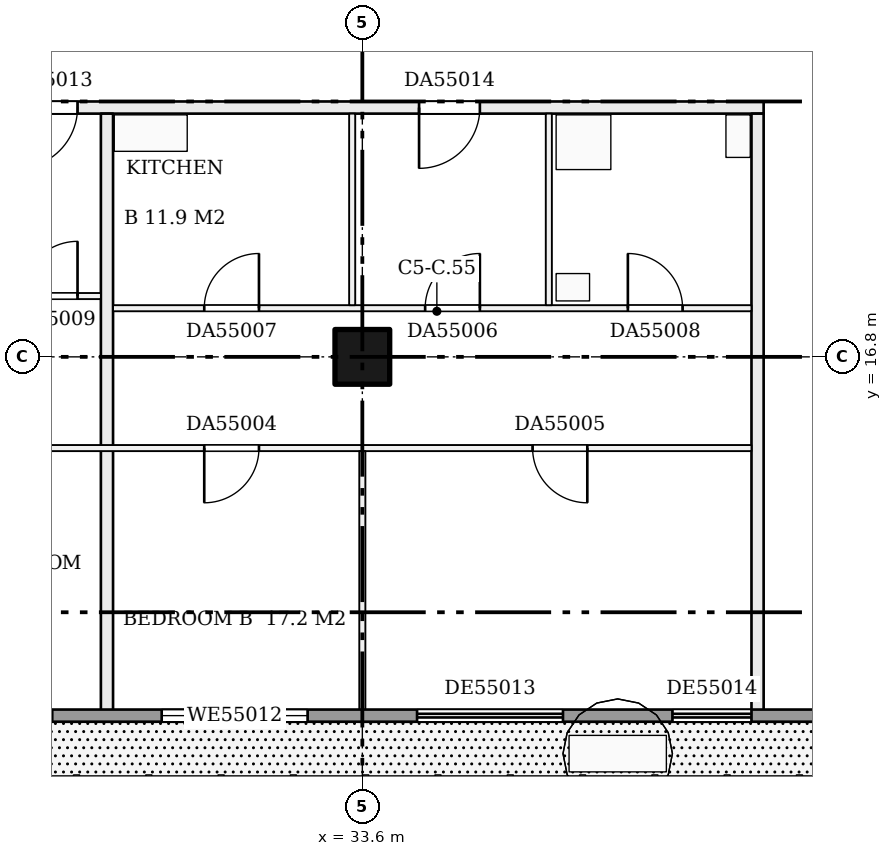
"""IFC4 building model, lengths in metres.
Left out: names, types, materials, properties, quantities, classifications, styles, units other than length and angle.
Written with IfcOpenShell. Run it as: python <this file> out.ifc"""

import sys

from ifc_helpers import new_model, si_unit, direction, frame, frame_2d, origin, origin_2d, place, context, subcontext, project, spatial, rectangle, extrude, element, fill, save


model = new_model("IFC4")
c1 = context("Model", 3, precision=1e-05, world=origin(), true_north=direction((0.0, 1.0)))
c2 = subcontext(c1, "Body", "Model", "MODEL_VIEW")
j1 = project(units=[si_unit("LENGTHUNIT", "METRE"), si_unit("PLANEANGLEUNIT", "RADIAN")], contexts=[c1])
p1 = place(None, origin())
s1 = spatial("IfcSite", under=j1, at=p1, CompositionType="ELEMENT")
p2 = place(p1, origin())
s2 = spatial("IfcBuilding", under=s1, at=p2, CompositionType="ELEMENT")
p3 = place(p2, frame((0.0, 0.0, 214.2)))
s3 = spatial("IfcBuildingStorey", under=s2, at=p3, CompositionType="ELEMENT", Elevation=214.2)
p4 = place(p3, frame((33.6, 16.8, 0.0), z_axis=(0.0, 0.0, 1.0), x_axis=(1.0, 0.0, 0.0)))
e1 = element("IfcColumn", 1, at=p4, inside=s3, PredefinedType="COLUMN", context=c2, shape_type="SweptSolid", body=[
    extrude(rectangle(XDim=0.9, YDim=0.9, at=origin_2d()), origin(), (0.0, 0.0, 1.0), 3.22),
])
p5 = place(p3, frame((21.1, 15.3, 0.0), z_axis=(0.0, 0.0, 1.0), x_axis=(1.0, 0.0, 0.0)))
e2 = element("IfcWall", 2, at=p5, inside=s3, PredefinedType="PARTITIONING", context=c2, shape_type="SweptSolid", body=[
    extrude(rectangle(XDim=18.9, YDim=0.1, at=frame_2d((9.45, 0.0))), origin(), (0.0, 0.0, 1.0), 3.22),
])
p6 = place(p5, frame((1.6, 0.0, 0.0)))
e3 = element("IfcOpeningElement", 3, at=p6, cuts=e2, PredefinedType="OPENING", context=c2, shape_type="SweptSolid", body=[
    extrude(rectangle(XDim=0.9, YDim=2.1, at=frame_2d((0.45, 1.05))), frame((0.0, 0.06, 0.0), z_axis=(0.0, -1.0, 0.0), x_axis=(1.0, 0.0, 0.0)), (0.0, 0.0, 1.0), 0.12),
])
p7 = place(p5, frame((5.7, 0.0, 0.0)))
e4 = element("IfcOpeningElement", 4, at=p7, cuts=e2, PredefinedType="OPENING", context=c2, shape_type="SweptSolid", body=[
    extrude(rectangle(XDim=0.9, YDim=2.1, at=frame_2d((0.45, 1.05))), frame((0.0, 0.06, 0.0), z_axis=(0.0, -1.0, 0.0), x_axis=(1.0, 0.0, 0.0)), (0.0, 0.0, 1.0), 0.12),
])
p8 = place(p5, frame((9.9, 0.0, 0.0)))
e5 = element("IfcOpeningElement", 5, at=p8, cuts=e2, PredefinedType="OPENING", context=c2, shape_type="SweptSolid", body=[
    extrude(rectangle(XDim=0.9, YDim=2.1, at=frame_2d((0.45, 1.05))), frame((0.0, 0.06, 0.0), z_axis=(0.0, -1.0, 0.0), x_axis=(1.0, 0.0, 0.0)), (0.0, 0.0, 1.0), 0.12),
])
p9 = place(p5, frame((15.3, 0.0, 0.0)))
e6 = element("IfcOpeningElement", 6, at=p9, cuts=e2, PredefinedType="OPENING", context=c2, shape_type="SweptSolid", body=[
    extrude(rectangle(XDim=0.9, YDim=2.1, at=frame_2d((0.45, 1.05))), frame((0.0, 0.06, 0.0), z_axis=(0.0, -1.0, 0.0), x_axis=(1.0, 0.0, 0.0)), (0.0, 0.0, 1.0), 0.12),
])
p10 = place(p3, frame((29.5, 17.6, 0.0), z_axis=(0.0, 0.0, 1.0), x_axis=(1.0, 0.0, 0.0)))
e7 = element("IfcWall", 7, at=p10, inside=s3, PredefinedType="PARTITIONING", context=c2, shape_type="SweptSolid", body=[
    extrude(rectangle(XDim=10.5, YDim=0.1, at=frame_2d((5.25, 0.0))), origin(), (0.0, 0.0, 1.0), 3.22),
])
p11 = place(p10, frame((5.133, 0.0, 0.0)))
e8 = element("IfcOpeningElement", 8, at=p11, cuts=e7, PredefinedType="OPENING", context=c2, shape_type="SweptSolid", body=[
    extrude(rectangle(XDim=0.9, YDim=2.1, at=frame_2d((0.45, 1.05))), frame((0.0, 0.06, 0.0), z_axis=(0.0, -1.0, 0.0), x_axis=(1.0, 0.0, 0.0)), (0.0, 0.0, 1.0), 0.12),
])
p12 = place(p10, frame((1.5, 0.0, 0.0)))
e9 = element("IfcOpeningElement", 9, at=p12, cuts=e7, PredefinedType="OPENING", context=c2, shape_type="SweptSolid", body=[
    extrude(rectangle(XDim=0.9, YDim=2.1, at=frame_2d((0.45, 1.05))), frame((0.0, 0.06, 0.0), z_axis=(0.0, -1.0, 0.0), x_axis=(1.0, 0.0, 0.0)), (0.0, 0.0, 1.0), 0.12),
])
p13 = place(p10, frame((8.467, 0.0, 0.0)))
e10 = element("IfcOpeningElement", 10, at=p13, cuts=e7, PredefinedType="OPENING", context=c2, shape_type="SweptSolid", body=[
    extrude(rectangle(XDim=0.9, YDim=2.1, at=frame_2d((0.45, 1.05))), frame((0.0, 0.06, 0.0), z_axis=(0.0, -1.0, 0.0), x_axis=(1.0, 0.0, 0.0)), (0.0, 0.0, 1.0), 0.12),
])
p14 = place(p3, frame((21.1, 17.8, 0.0), z_axis=(0.0, 0.0, 1.0), x_axis=(1.0, 0.0, 0.0)))
e11 = element("IfcWall", 11, at=p14, inside=s3, PredefinedType="PARTITIONING", context=c2, shape_type="SweptSolid", body=[
    extrude(rectangle(XDim=8.2, YDim=0.1, at=frame_2d((4.1, 0.0))), origin(), (0.0, 0.0, 1.0), 3.22),
])
p15 = place(p14, frame((6.916, 0.0, 0.0)))
e12 = element("IfcOpeningElement", 12, at=p15, cuts=e11, PredefinedType="OPENING", context=c2, shape_type="SweptSolid", body=[
    extrude(rectangle(XDim=0.9, YDim=2.1, at=frame_2d((0.45, 1.05))), frame((0.0, 0.06, 0.0), z_axis=(0.0, -1.0, 0.0), x_axis=(1.0, 0.0, 0.0)), (0.0, 0.0, 1.0), 0.12),
])
p16 = place(p14, frame((0.8, 0.0, 0.0)))
e13 = element("IfcOpeningElement", 13, at=p16, cuts=e11, PredefinedType="OPENING", context=c2, shape_type="SweptSolid", body=[
    extrude(rectangle(XDim=0.9, YDim=2.1, at=frame_2d((0.45, 1.05))), frame((0.0, 0.06, 0.0), z_axis=(0.0, -1.0, 0.0), x_axis=(1.0, 0.0, 0.0)), (0.0, 0.0, 1.0), 0.12),
])
p17 = place(p14, frame((2.784, 0.0, 0.0)))
e14 = element("IfcOpeningElement", 14, at=p17, cuts=e11, PredefinedType="OPENING", context=c2, shape_type="SweptSolid", body=[
    extrude(rectangle(XDim=0.9, YDim=2.1, at=frame_2d((0.45, 1.05))), frame((0.0, 0.06, 0.0), z_axis=(0.0, -1.0, 0.0), x_axis=(1.0, 0.0, 0.0)), (0.0, 0.0, 1.0), 0.12),
])
p18 = place(p14, frame((5.174, 0.0, 0.0)))
e15 = element("IfcOpeningElement", 15, at=p18, cuts=e11, PredefinedType="OPENING", context=c2, shape_type="SweptSolid", body=[
    extrude(rectangle(XDim=0.9, YDim=2.1, at=frame_2d((0.45, 1.05))), frame((0.0, 0.06, 0.0), z_axis=(0.0, -1.0, 0.0), x_axis=(1.0, 0.0, 0.0)), (0.0, 0.0, 1.0), 0.12),
])
p19 = place(p3, frame((20.9, 20.9, 0.0), z_axis=(0.0, 0.0, 1.0), x_axis=(1.0, 0.0, 0.0)))
e16 = element("IfcWall", 16, at=p19, inside=s3, PredefinedType="PARTITIONING", context=c2, shape_type="SweptSolid", body=[
    extrude(rectangle(XDim=19.3, YDim=0.2, at=frame_2d((9.65, 0.0))), origin(), (0.0, 0.0, 1.0), 3.22),
])
p20 = place(p19, frame((7.016, 0.0, 0.0)))
e17 = element("IfcOpeningElement", 17, at=p20, cuts=e16, PredefinedType="OPENING", context=c2, shape_type="SweptSolid", body=[
    extrude(rectangle(XDim=1.0, YDim=2.1, at=frame_2d((0.5, 1.05))), frame((0.0, 0.11, 0.0), z_axis=(0.0, -1.0, 0.0), x_axis=(1.0, 0.0, 0.0)), (0.0, 0.0, 1.0), 0.22),
])
p21 = place(p19, frame((13.633, 0.0, 0.0)))
e18 = element("IfcOpeningElement", 18, at=p21, cuts=e16, PredefinedType="OPENING", context=c2, shape_type="SweptSolid", body=[
    extrude(rectangle(XDim=1.0, YDim=2.1, at=frame_2d((0.5, 1.05))), frame((0.0, 0.11, 0.0), z_axis=(0.0, -1.0, 0.0), x_axis=(1.0, 0.0, 0.0)), (0.0, 0.0, 1.0), 0.22),
])
p22 = place(p3, frame((29.4, 10.9, 0.0), z_axis=(0.0, 0.0, 1.0), x_axis=(0.0, 1.0, 0.0)))
e19 = element("IfcWall", 19, at=p22, inside=s3, PredefinedType="PARTITIONING", context=c2, shape_type="SweptSolid", body=[
    extrude(rectangle(XDim=9.9, YDim=0.2, at=frame_2d((4.95, 0.0))), origin(), (0.0, 0.0, 1.0), 3.22),
])
p23 = place(p3, frame((33.433, 17.65, 0.0), z_axis=(0.0, 0.0, 1.0), x_axis=(0.0, 1.0, 0.0)))
e20 = element("IfcWall", 20, at=p23, inside=s3, PredefinedType="PARTITIONING", context=c2, shape_type="SweptSolid", body=[
    extrude(rectangle(XDim=3.15, YDim=0.1, at=frame_2d((1.575, 0.0))), origin(), (0.0, 0.0, 1.0), 3.22),
])
p24 = place(p3, frame((33.6, 10.9, 0.0), z_axis=(0.0, 0.0, 1.0), x_axis=(0.0, 1.0, 0.0)))
e21 = element("IfcWall", 21, at=p24, inside=s3, PredefinedType="PARTITIONING", context=c2, shape_type="SweptSolid", body=[
    extrude(rectangle(XDim=4.35, YDim=0.1, at=frame_2d((2.175, 0.0))), origin(), (0.0, 0.0, 1.0), 3.22),
])
p25 = place(p3, frame((36.667, 17.65, 0.0), z_axis=(0.0, 0.0, 1.0), x_axis=(0.0, 1.0, 0.0)))
e22 = element("IfcWall", 22, at=p25, inside=s3, PredefinedType="PARTITIONING", context=c2, shape_type="SweptSolid", body=[
    extrude(rectangle(XDim=3.15, YDim=0.1, at=frame_2d((1.575, 0.0))), origin(), (0.0, 0.0, 1.0), 3.22),
])
p26 = place(p3, frame((40.1, 10.9, 0.0), z_axis=(0.0, 0.0, 1.0), x_axis=(0.0, 1.0, 0.0)))
e23 = element("IfcWall", 23, at=p26, inside=s3, PredefinedType="PARTITIONING", context=c2, shape_type="SweptSolid", body=[
    extrude(rectangle(XDim=9.9, YDim=0.2, at=frame_2d((4.95, 0.0))), origin(), (0.0, 0.0, 1.0), 3.22),
])
p27 = place(p3, frame((13.2, 10.9, 0.0), z_axis=(0.0, 0.0, 1.0), x_axis=(1.0, 0.0, 0.0)))
e24 = element("IfcWall", 24, at=p27, inside=s3, PredefinedType="SOLIDWALL", context=c2, shape_type="SweptSolid", body=[
    extrude(rectangle(XDim=28.8, YDim=0.2, at=frame_2d((14.4, 0.0))), origin(), (0.0, 0.0, 1.0), 3.22),
])
p28 = place(p27, frame((0.3, 0.0, 0.0)))
e25 = element("IfcOpeningElement", 25, at=p28, cuts=e24, PredefinedType="OPENING", context=c2, shape_type="SweptSolid", body=[
    extrude(rectangle(XDim=2.4, YDim=2.2, at=frame_2d((1.2, 1.1))), frame((0.0, 0.11, 0.0), z_axis=(0.0, -1.0, 0.0), x_axis=(1.0, 0.0, 0.0)), (0.0, 0.0, 1.0), 0.22),
])
p29 = place(p27, frame((4.5, 0.0, 0.0)))
e26 = element("IfcOpeningElement", 26, at=p29, cuts=e24, PredefinedType="OPENING", context=c2, shape_type="SweptSolid", body=[
    extrude(rectangle(XDim=2.4, YDim=2.2, at=frame_2d((1.2, 1.1))), frame((0.0, 0.11, 0.0), z_axis=(0.0, -1.0, 0.0), x_axis=(1.0, 0.0, 0.0)), (0.0, 0.0, 1.0), 0.22),
])
p30 = place(p27, frame((8.7, 0.0, 0.9)))
e27 = element("IfcOpeningElement", 27, at=p30, cuts=e24, PredefinedType="OPENING", context=c2, shape_type="SweptSolid", body=[
    extrude(rectangle(XDim=2.4, YDim=1.5, at=frame_2d((1.2, 0.75))), frame((0.0, 0.11, 0.0), z_axis=(0.0, -1.0, 0.0), x_axis=(1.0, 0.0, 0.0)), (0.0, 0.0, 1.0), 0.22),
])
p31 = place(p27, frame((12.9, 0.0, 0.9)))
e28 = element("IfcOpeningElement", 28, at=p31, cuts=e24, PredefinedType="OPENING", context=c2, shape_type="SweptSolid", body=[
    extrude(rectangle(XDim=2.4, YDim=1.5, at=frame_2d((1.2, 0.75))), frame((0.0, 0.11, 0.0), z_axis=(0.0, -1.0, 0.0), x_axis=(1.0, 0.0, 0.0)), (0.0, 0.0, 1.0), 0.22),
])
p32 = place(p27, frame((17.1, 0.0, 0.9)))
e29 = element("IfcOpeningElement", 29, at=p32, cuts=e24, PredefinedType="OPENING", context=c2, shape_type="SweptSolid", body=[
    extrude(rectangle(XDim=2.4, YDim=1.5, at=frame_2d((1.2, 0.75))), frame((0.0, 0.11, 0.0), z_axis=(0.0, -1.0, 0.0), x_axis=(1.0, 0.0, 0.0)), (0.0, 0.0, 1.0), 0.22),
])
p33 = place(p27, frame((21.3, 0.0, 0.0)))
e30 = element("IfcOpeningElement", 30, at=p33, cuts=e24, PredefinedType="OPENING", context=c2, shape_type="SweptSolid", body=[
    extrude(rectangle(XDim=2.4, YDim=2.2, at=frame_2d((1.2, 1.1))), frame((0.0, 0.11, 0.0), z_axis=(0.0, -1.0, 0.0), x_axis=(1.0, 0.0, 0.0)), (0.0, 0.0, 1.0), 0.22),
])
p34 = place(p27, frame((25.5, 0.0, 0.0)))
e31 = element("IfcOpeningElement", 31, at=p34, cuts=e24, PredefinedType="OPENING", context=c2, shape_type="SweptSolid", body=[
    extrude(rectangle(XDim=1.3, YDim=2.2, at=frame_2d((0.65, 1.1))), frame((0.0, 0.11, 0.0), z_axis=(0.0, -1.0, 0.0), x_axis=(1.0, 0.0, 0.0)), (0.0, 0.0, 1.0), 0.22),
])
p35 = place(p8, frame((0.9, 0.0, 0.0), z_axis=(0.0, 0.0, 1.0), x_axis=(-1.0, 0.0, 0.0)))
e32 = element("IfcDoor", 32, at=p35, inside=s3, OperationType="SINGLE_SWING_RIGHT", PredefinedType="DOOR", context=c2, shape_type="SweptSolid", body=[
    extrude(rectangle(XDim=0.9, YDim=2.1, at=frame_2d((0.45, 1.05))), frame((0.0, 0.025, 0.0), z_axis=(0.0, -1.0, 0.0), x_axis=(1.0, 0.0, 0.0)), (0.0, 0.0, 1.0), 0.05),
])
fill(e5, e32)
p36 = place(p9, frame((0.9, 0.0, 0.0), z_axis=(0.0, 0.0, 1.0), x_axis=(-1.0, 0.0, 0.0)))
e33 = element("IfcDoor", 33, at=p36, inside=s3, OperationType="SINGLE_SWING_LEFT", PredefinedType="DOOR", context=c2, shape_type="SweptSolid", body=[
    extrude(rectangle(XDim=0.9, YDim=2.1, at=frame_2d((0.45, 1.05))), frame((0.0, 0.025, 0.0), z_axis=(0.0, -1.0, 0.0), x_axis=(1.0, 0.0, 0.0)), (0.0, 0.0, 1.0), 0.05),
])
fill(e6, e33)
p37 = place(p11, origin())
e34 = element("IfcDoor", 34, at=p37, inside=s3, OperationType="SINGLE_SWING_RIGHT", PredefinedType="DOOR", context=c2, shape_type="SweptSolid", body=[
    extrude(rectangle(XDim=0.9, YDim=2.1, at=frame_2d((0.45, 1.05))), frame((0.0, 0.025, 0.0), z_axis=(0.0, -1.0, 0.0), x_axis=(1.0, 0.0, 0.0)), (0.0, 0.0, 1.0), 0.05),
])
fill(e8, e34)
p38 = place(p12, origin())
e35 = element("IfcDoor", 35, at=p38, inside=s3, OperationType="SINGLE_SWING_RIGHT", PredefinedType="DOOR", context=c2, shape_type="SweptSolid", body=[
    extrude(rectangle(XDim=0.9, YDim=2.1, at=frame_2d((0.45, 1.05))), frame((0.0, 0.025, 0.0), z_axis=(0.0, -1.0, 0.0), x_axis=(1.0, 0.0, 0.0)), (0.0, 0.0, 1.0), 0.05),
])
fill(e9, e35)
p39 = place(p13, origin())
e36 = element("IfcDoor", 36, at=p39, inside=s3, OperationType="SINGLE_SWING_LEFT", PredefinedType="DOOR", context=c2, shape_type="SweptSolid", body=[
    extrude(rectangle(XDim=0.9, YDim=2.1, at=frame_2d((0.45, 1.05))), frame((0.0, 0.025, 0.0), z_axis=(0.0, -1.0, 0.0), x_axis=(1.0, 0.0, 0.0)), (0.0, 0.0, 1.0), 0.05),
])
fill(e10, e36)
p40 = place(p15, origin())
e37 = element("IfcDoor", 37, at=p40, inside=s3, OperationType="SINGLE_SWING_RIGHT", PredefinedType="DOOR", context=c2, shape_type="SweptSolid", body=[
    extrude(rectangle(XDim=0.9, YDim=2.1, at=frame_2d((0.45, 1.05))), frame((0.0, 0.025, 0.0), z_axis=(0.0, -1.0, 0.0), x_axis=(1.0, 0.0, 0.0)), (0.0, 0.0, 1.0), 0.05),
])
fill(e12, e37)
p41 = place(p20, frame((1.0, 0.0, 0.0), z_axis=(0.0, 0.0, 1.0), x_axis=(-1.0, 0.0, 0.0)))
e38 = element("IfcDoor", 38, at=p41, inside=s3, OperationType="SINGLE_SWING_RIGHT", PredefinedType="DOOR", context=c2, shape_type="SweptSolid", body=[
    extrude(rectangle(XDim=1.0, YDim=2.1, at=frame_2d((0.5, 1.05))), frame((0.0, 0.025, 0.0), z_axis=(0.0, -1.0, 0.0), x_axis=(1.0, 0.0, 0.0)), (0.0, 0.0, 1.0), 0.05),
])
fill(e17, e38)
p42 = place(p21, frame((1.0, 0.0, 0.0), z_axis=(0.0, 0.0, 1.0), x_axis=(-1.0, 0.0, 0.0)))
e39 = element("IfcDoor", 39, at=p42, inside=s3, OperationType="SINGLE_SWING_RIGHT", PredefinedType="DOOR", context=c2, shape_type="SweptSolid", body=[
    extrude(rectangle(XDim=1.0, YDim=2.1, at=frame_2d((0.5, 1.05))), frame((0.0, 0.025, 0.0), z_axis=(0.0, -1.0, 0.0), x_axis=(1.0, 0.0, 0.0)), (0.0, 0.0, 1.0), 0.05),
])
fill(e18, e39)
p43 = place(p32, origin())
e40 = element("IfcWindow", 40, at=p43, inside=s3, PartitioningType="SINGLE_PANEL", PredefinedType="WINDOW", context=c2, shape_type="SweptSolid", body=[
    extrude(rectangle(XDim=2.4, YDim=1.5, at=frame_2d((1.2, 0.75))), frame((0.0, 0.03, 0.0), z_axis=(0.0, -1.0, 0.0), x_axis=(1.0, 0.0, 0.0)), (0.0, 0.0, 1.0), 0.06),
])
fill(e29, e40)
p44 = place(p33, origin())
e41 = element("IfcDoor", 41, at=p44, inside=s3, OperationType="DOUBLE_DOOR_SLIDING", PredefinedType="DOOR", context=c2, shape_type="SweptSolid", body=[
    extrude(rectangle(XDim=2.4, YDim=2.2, at=frame_2d((1.2, 1.1))), frame((0.0, 0.025, 0.0), z_axis=(0.0, -1.0, 0.0), x_axis=(1.0, 0.0, 0.0)), (0.0, 0.0, 1.0), 0.05),
])
fill(e30, e41)
p45 = place(p34, origin())
e42 = element("IfcDoor", 42, at=p45, inside=s3, OperationType="DOUBLE_DOOR_SLIDING", PredefinedType="DOOR", context=c2, shape_type="SweptSolid", body=[
    extrude(rectangle(XDim=1.3, YDim=2.2, at=frame_2d((0.65, 1.1))), frame((0.0, 0.025, 0.0), z_axis=(0.0, -1.0, 0.0), x_axis=(1.0, 0.0, 0.0)), (0.0, 0.0, 1.0), 0.05),
])
fill(e31, e42)
save(model, sys.argv[1])
